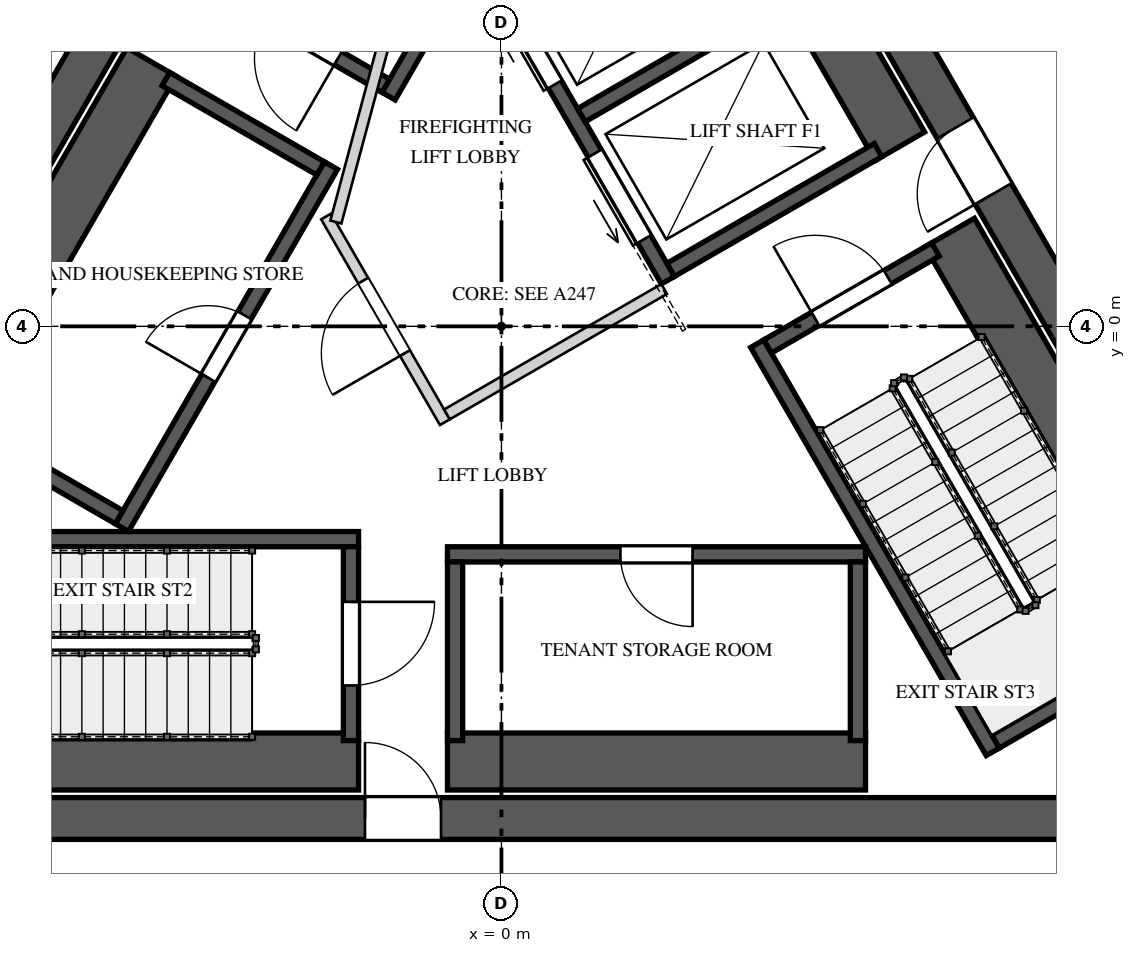
"""IFC4 building model, lengths in metres.
Left out: names, types, materials, properties, quantities, classifications, styles, units other than length and angle.
Written with IfcOpenShell. Run it as: python <this file> out.ifc"""

import sys

from ifc_helpers import new_model, si_unit, direction, frame, frame_2d, origin, place, context, subcontext, project, spatial, rectangle, extrude, element, fill, save


model = new_model("IFC4")
c1 = context("Model", 3, precision=1e-05, world=origin(), true_north=direction((0.0, 1.0)))
c2 = subcontext(c1, "Body", "Model", "MODEL_VIEW")
j1 = project(units=[si_unit("LENGTHUNIT", "METRE"), si_unit("PLANEANGLEUNIT", "RADIAN")], contexts=[c1])
p1 = place(None, origin())
s1 = spatial("IfcSite", under=j1, at=p1, CompositionType="ELEMENT")
p2 = place(p1, origin())
s2 = spatial("IfcBuilding", under=s1, at=p2, CompositionType="ELEMENT")
p3 = place(p2, frame((0.0, 0.0, 361.4)))
s3 = spatial("IfcBuildingStorey", under=s2, at=p3, CompositionType="ELEMENT", Elevation=361.4)
p4 = place(p3, frame((-1.285, 10.725, 0.0), z_axis=(0.0, 0.0, 1.0), x_axis=(-0.499994590896, -0.86602852671, 0.0)))
e1 = element("IfcWall", 1, at=p4, inside=s3, PredefinedType="SHEAR", context=c2, shape_type="SweptSolid", body=[
    extrude(rectangle(XDim=17.292, YDim=0.55, at=frame_2d((8.646, 0.0))), origin(), (0.0, 0.0, 1.0), 4.5),
])
p5 = place(p4, frame((6.851, 0.0, 0.0)))
e2 = element("IfcOpeningElement", 2, at=p5, cuts=e1, PredefinedType="OPENING", context=c2, shape_type="SweptSolid", body=[
    extrude(rectangle(XDim=1.0, YDim=2.4, at=frame_2d((0.5, 1.2))), frame((0.0, 0.285, 0.0), z_axis=(0.0, -1.0, 0.0), x_axis=(1.0, 0.0, 0.0)), (0.0, 0.0, 1.0), 0.57),
])
p6 = place(p4, frame((15.089, 0.0, 0.0)))
e3 = element("IfcOpeningElement", 3, at=p6, cuts=e1, PredefinedType="OPENING", context=c2, shape_type="SweptSolid", body=[
    extrude(rectangle(XDim=0.8, YDim=2.1, at=frame_2d((0.4, 1.05))), frame((0.0, 0.285, 0.0), z_axis=(0.0, -1.0, 0.0), x_axis=(1.0, 0.0, 0.0)), (0.0, 0.0, 1.0), 0.57),
])
p7 = place(p3, frame((-8.646, -6.475, 0.0), z_axis=(0.0, 0.0, 1.0), x_axis=(1.0, 0.0, 0.0)))
e4 = element("IfcWall", 4, at=p7, inside=s3, PredefinedType="SHEAR", context=c2, shape_type="SweptSolid", body=[
    extrude(rectangle(XDim=17.292, YDim=0.55, at=frame_2d((8.646, 0.0))), origin(), (0.0, 0.0, 1.0), 4.5),
])
p8 = place(p7, frame((6.851, 0.0, 0.0)))
e5 = element("IfcOpeningElement", 5, at=p8, cuts=e4, PredefinedType="OPENING", context=c2, shape_type="SweptSolid", body=[
    extrude(rectangle(XDim=1.0, YDim=2.4, at=frame_2d((0.5, 1.2))), frame((0.0, 0.285, 0.0), z_axis=(0.0, -1.0, 0.0), x_axis=(1.0, 0.0, 0.0)), (0.0, 0.0, 1.0), 0.57),
])
p9 = place(p3, frame((9.93, -4.25, 0.0), z_axis=(0.0, 0.0, 1.0), x_axis=(-0.499994590896, 0.86602852671, 0.0)))
e6 = element("IfcWall", 6, at=p9, inside=s3, PredefinedType="SHEAR", context=c2, shape_type="SweptSolid", body=[
    extrude(rectangle(XDim=17.292, YDim=0.55, at=frame_2d((8.646, 0.0))), origin(), (0.0, 0.0, 1.0), 4.5),
])
p10 = place(p9, frame((6.921, 0.0, 0.0)))
e7 = element("IfcOpeningElement", 7, at=p10, cuts=e6, PredefinedType="OPENING", context=c2, shape_type="SweptSolid", body=[
    extrude(rectangle(XDim=1.0, YDim=2.4, at=frame_2d((0.5, 1.2))), frame((0.0, 0.285, 0.0), z_axis=(0.0, -1.0, 0.0), x_axis=(1.0, 0.0, 0.0)), (0.0, 0.0, 1.0), 0.57),
])
p11 = place(p3, frame((1.615, 8.397, 0.0), z_axis=(0.0, 0.0, 1.0), x_axis=(-0.500009909098, -0.866019682689, 0.0)))
e8 = element("IfcWall", 8, at=p11, inside=s3, PredefinedType="SOLIDWALL", context=c2, shape_type="SweptSolid", body=[
    extrude(rectangle(XDim=6.2, YDim=0.2, at=frame_2d((3.1, 0.0))), origin(), (0.0, 0.0, 1.0), 4.15),
])
p12 = place(p3, frame((-1.521, 3.165, 0.0), z_axis=(0.0, 0.0, 1.0), x_axis=(-0.866030925526, 0.499990435942, 0.0)))
e9 = element("IfcWall", 9, at=p12, inside=s3, PredefinedType="SOLIDWALL", context=c2, shape_type="SweptSolid", body=[
    extrude(rectangle(XDim=2.55, YDim=0.2, at=frame_2d((1.275, 0.0))), origin(), (0.0, 0.0, 1.0), 4.15),
])
p13 = place(p12, frame((0.725, 0.0, 0.0)))
e10 = element("IfcOpeningElement", 10, at=p13, cuts=e9, PredefinedType="OPENING", context=c2, shape_type="SweptSolid", body=[
    extrude(rectangle(XDim=1.1, YDim=2.4, at=frame_2d((0.55, 1.2))), frame((0.0, 0.11, 0.0), z_axis=(0.0, -1.0, 0.0), x_axis=(1.0, 0.0, 0.0)), (0.0, 0.0, 1.0), 0.22),
])
p14 = place(p3, frame((-8.08, -5.725, 0.0), z_axis=(0.0, 0.0, 1.0), x_axis=(1.0, 0.0, 0.0)))
e11 = element("IfcWall", 11, at=p14, inside=s3, PredefinedType="SOLIDWALL", context=c2, shape_type="SweptSolid", body=[
    extrude(rectangle(XDim=6.2, YDim=0.75, at=frame_2d((3.1, 0.0))), origin(), (0.0, 0.0, 1.0), 4.15),
])
p15 = place(p3, frame((-8.08, -2.8, 0.0), z_axis=(0.0, 0.0, 1.0), x_axis=(1.0, 0.0, 0.0)))
e12 = element("IfcWall", 12, at=p15, inside=s3, PredefinedType="SOLIDWALL", context=c2, shape_type="SweptSolid", body=[
    extrude(rectangle(XDim=6.2, YDim=0.2, at=frame_2d((3.1, 0.0))), origin(), (0.0, 0.0, 1.0), 4.15),
])
p16 = place(p3, frame((-1.98, -2.9, 0.0), z_axis=(0.0, 0.0, 1.0), x_axis=(0.0, -1.0, 0.0)))
e13 = element("IfcWall", 13, at=p16, inside=s3, PredefinedType="SOLIDWALL", context=c2, shape_type="SweptSolid", body=[
    extrude(rectangle(XDim=2.55, YDim=0.2, at=frame_2d((1.275, 0.0))), origin(), (0.0, 0.0, 1.0), 4.15),
])
p17 = place(p16, frame((0.725, 0.0, 0.0)))
e14 = element("IfcOpeningElement", 14, at=p17, cuts=e13, PredefinedType="OPENING", context=c2, shape_type="SweptSolid", body=[
    extrude(rectangle(XDim=1.1, YDim=2.4, at=frame_2d((0.55, 1.2))), frame((0.0, 0.11, 0.0), z_axis=(0.0, -1.0, 0.0), x_axis=(1.0, 0.0, 0.0)), (0.0, 0.0, 1.0), 0.22),
])
p18 = place(p3, frame((8.998, -4.135, 0.0), z_axis=(0.0, 0.0, 1.0), x_axis=(-0.500009909098, 0.866019682689, 0.0)))
e15 = element("IfcWall", 15, at=p18, inside=s3, PredefinedType="SOLIDWALL", context=c2, shape_type="SweptSolid", body=[
    extrude(rectangle(XDim=6.2, YDim=0.75, at=frame_2d((3.1, 0.0))), origin(), (0.0, 0.0, 1.0), 4.15),
])
p19 = place(p3, frame((6.465, -5.597, 0.0), z_axis=(0.0, 0.0, 1.0), x_axis=(-0.49998037582, 0.866036733513, 0.0)))
e16 = element("IfcWall", 16, at=p19, inside=s3, PredefinedType="SOLIDWALL", context=c2, shape_type="SweptSolid", body=[
    extrude(rectangle(XDim=6.2, YDim=0.2, at=frame_2d((3.1, 0.0))), origin(), (0.0, 0.0, 1.0), 4.15),
])
p20 = place(p3, frame((6.501, -5.461, 0.0), z_axis=(0.0, 0.0, 1.0), x_axis=(0.865989465428, 0.500062241894, 0.0)))
e17 = element("IfcWall", 17, at=p20, inside=s3, PredefinedType="SOLIDWALL", context=c2, shape_type="SweptSolid", body=[
    extrude(rectangle(XDim=2.55, YDim=0.2, at=frame_2d((1.275, 0.0))), origin(), (0.0, 0.0, 1.0), 4.15),
])
p21 = place(p3, frame((3.501, -0.265, 0.0), z_axis=(0.0, 0.0, 1.0), x_axis=(0.866030925526, 0.499990435942, 0.0)))
e18 = element("IfcWall", 18, at=p21, inside=s3, PredefinedType="SOLIDWALL", context=c2, shape_type="SweptSolid", body=[
    extrude(rectangle(XDim=2.55, YDim=0.2, at=frame_2d((1.275, 0.0))), origin(), (0.0, 0.0, 1.0), 4.15),
])
p22 = place(p21, frame((0.725, 0.0, 0.0)))
e19 = element("IfcOpeningElement", 19, at=p22, cuts=e18, PredefinedType="OPENING", context=c2, shape_type="SweptSolid", body=[
    extrude(rectangle(XDim=1.1, YDim=2.4, at=frame_2d((0.55, 1.2))), frame((0.0, 0.11, 0.0), z_axis=(0.0, -1.0, 0.0), x_axis=(1.0, 0.0, 0.0)), (0.0, 0.0, 1.0), 0.22),
])
p23 = place(p3, frame((-4.993, -2.648, 0.0), z_axis=(0.0, 0.0, 1.0), x_axis=(0.499996545922, 0.866027397988, 0.0)))
e20 = element("IfcWall", 20, at=p23, inside=s3, PredefinedType="SOLIDWALL", context=c2, shape_type="SweptSolid", body=[
    extrude(rectangle(XDim=5.5, YDim=0.2, at=frame_2d((2.75, 0.0))), origin(), (0.0, 0.0, 1.0), 4.15),
])
p24 = place(p23, frame((2.275, 0.0, 0.0)))
e21 = element("IfcOpeningElement", 21, at=p24, cuts=e20, PredefinedType="OPENING", context=c2, shape_type="SweptSolid", body=[
    extrude(rectangle(XDim=0.95, YDim=2.4, at=frame_2d((0.475, 1.2))), frame((0.0, 0.11, 0.0), z_axis=(0.0, -1.0, 0.0), x_axis=(1.0, 0.0, 0.0)), (0.0, 0.0, 1.0), 0.22),
])
p25 = place(p3, frame((-4.603, 3.477, 0.0), z_axis=(0.0, 0.0, 1.0), x_axis=(-0.500015767406, -0.866016300277, 0.0)))
e22 = element("IfcWall", 22, at=p25, inside=s3, PredefinedType="SOLIDWALL", context=c2, shape_type="SweptSolid", body=[
    extrude(rectangle(XDim=5.5, YDim=0.75, at=frame_2d((2.75, 0.0))), origin(), (0.0, 0.0, 1.0), 4.15),
])
p26 = place(p3, frame((-2.38, 2.078, 0.0), z_axis=(0.0, 0.0, 1.0), x_axis=(-0.866061024631, 0.499938297808, 0.0)))
e23 = element("IfcWall", 23, at=p26, inside=s3, PredefinedType="SOLIDWALL", context=c2, shape_type="SweptSolid", body=[
    extrude(rectangle(XDim=2.35, YDim=0.2, at=frame_2d((1.175, 0.0))), origin(), (0.0, 0.0, 1.0), 4.15),
])
p27 = place(p3, frame((-5.03, -2.512, 0.0), z_axis=(0.0, 0.0, 1.0), x_axis=(-0.866016039709, 0.500016218704, 0.0)))
e24 = element("IfcWall", 24, at=p27, inside=s3, PredefinedType="SOLIDWALL", context=c2, shape_type="SweptSolid", body=[
    extrude(rectangle(XDim=2.35, YDim=0.2, at=frame_2d((1.175, 0.0))), origin(), (0.0, 0.0, 1.0), 4.15),
])
p28 = place(p3, frame((4.79, -3.0, 0.0), z_axis=(0.0, 0.0, 1.0), x_axis=(-1.0, 0.0, 0.0)))
e25 = element("IfcWall", 25, at=p28, inside=s3, PredefinedType="SOLIDWALL", context=c2, shape_type="SweptSolid", body=[
    extrude(rectangle(XDim=5.5, YDim=0.2, at=frame_2d((2.75, 0.0))), origin(), (0.0, 0.0, 1.0), 4.15),
])
p29 = place(p28, frame((2.275, 0.0, 0.0)))
e26 = element("IfcOpeningElement", 26, at=p29, cuts=e25, PredefinedType="OPENING", context=c2, shape_type="SweptSolid", body=[
    extrude(rectangle(XDim=0.95, YDim=2.4, at=frame_2d((0.475, 1.2))), frame((0.0, 0.11, 0.0), z_axis=(0.0, -1.0, 0.0), x_axis=(1.0, 0.0, 0.0)), (0.0, 0.0, 1.0), 0.22),
])
p30 = place(p3, frame((-0.71, -5.725, 0.0), z_axis=(0.0, 0.0, 1.0), x_axis=(1.0, 0.0, 0.0)))
e27 = element("IfcWall", 27, at=p30, inside=s3, PredefinedType="SOLIDWALL", context=c2, shape_type="SweptSolid", body=[
    extrude(rectangle(XDim=5.5, YDim=0.75, at=frame_2d((2.75, 0.0))), origin(), (0.0, 0.0, 1.0), 4.15),
])
for number, where, z_axis, x_axis in (
    (28, (-0.61, -3.1, 0.0), (0.0, 0.0, 1.0), (0.0, -1.0, 0.0)),
    (29, (4.69, -3.1, 0.0), (0.0, 0.0, 1.0), (0.0, -1.0, 0.0)),
):
    element("IfcWall", number, at=place(p3, frame(where, z_axis=z_axis, x_axis=x_axis)), inside=s3, PredefinedType="SOLIDWALL", context=c2, shape_type="SweptSolid", body=[
        extrude(rectangle(XDim=2.35, YDim=0.2, at=frame_2d((1.175, 0.0))), origin(), (0.0, 0.0, 1.0), 4.15),
    ])
p31 = place(p3, frame((2.19, 0.606, 0.0), z_axis=(0.0, 0.0, 1.0), x_axis=(-0.500002801628, 0.866023786258, 0.0)))
e30 = element("IfcWall", 30, at=p31, inside=s3, PredefinedType="SOLIDWALL", context=c2, shape_type="SweptSolid", body=[
    extrude(rectangle(XDim=4.9, YDim=0.2, at=frame_2d((2.45, 0.0))), origin(), (0.0, 0.0, 1.0), 4.15),
])
p32 = place(p31, frame((0.625, 0.0, 0.0)))
e31 = element("IfcOpeningElement", 31, at=p32, cuts=e30, PredefinedType="OPENING", context=c2, shape_type="SweptSolid", body=[
    extrude(rectangle(XDim=1.3, YDim=2.1, at=frame_2d((0.65, 1.05))), frame((0.0, 0.11, 0.0), z_axis=(0.0, -1.0, 0.0), x_axis=(1.0, 0.0, 0.0)), (0.0, 0.0, 1.0), 0.22),
])
p33 = place(p31, frame((2.975, 0.0, 0.0)))
e32 = element("IfcOpeningElement", 32, at=p33, cuts=e30, PredefinedType="OPENING", context=c2, shape_type="SweptSolid", body=[
    extrude(rectangle(XDim=1.3, YDim=2.1, at=frame_2d((0.65, 1.05))), frame((0.0, 0.11, 0.0), z_axis=(0.0, -1.0, 0.0), x_axis=(1.0, 0.0, 0.0)), (0.0, 0.0, 1.0), 0.22),
])
p34 = place(p3, frame((5.243, 2.369, 0.0), z_axis=(0.0, 0.0, 1.0), x_axis=(-0.500002801628, 0.866023786258, 0.0)))
e33 = element("IfcWall", 33, at=p34, inside=s3, PredefinedType="SOLIDWALL", context=c2, shape_type="SweptSolid", body=[
    extrude(rectangle(XDim=4.9, YDim=0.75, at=frame_2d((2.45, 0.0))), origin(), (0.0, 0.0, 1.0), 4.15),
])
for number, where, z_axis, x_axis in (
    (34, (2.227, 0.743, 0.0), (0.0, 0.0, 1.0), (0.866, 0.5, 0.0)),
    (35, (1.052, 2.778, 0.0), (0.0, 0.0, 1.0), (0.866, 0.5, 0.0)),
):
    element("IfcWall", number, at=place(p3, frame(where, z_axis=z_axis, x_axis=x_axis)), inside=s3, PredefinedType="SOLIDWALL", context=c2, shape_type="SweptSolid", body=[
        extrude(rectangle(XDim=3.15, YDim=0.2, at=frame_2d((1.575, 0.0))), origin(), (0.0, 0.0, 1.0), 4.15),
    ])
p35 = place(p3, frame((-0.744, -1.261, 0.0), z_axis=(0.0, 0.0, 1.0), x_axis=(-0.500004234368, 0.866022959057, 0.0)))
e36 = element("IfcWall", 36, at=p35, inside=s3, PredefinedType="PARTITIONING", context=c2, shape_type="SweptSolid", body=[
    extrude(rectangle(XDim=3.125, YDim=0.15, at=frame_2d((1.562, 0.0))), origin(), (0.0, 0.0, 1.0), 4.15),
])
p36 = place(p35, frame((1.05, 0.0, 0.0)))
e37 = element("IfcOpeningElement", 37, at=p36, cuts=e36, PredefinedType="OPENING", context=c2, shape_type="SweptSolid", body=[
    extrude(rectangle(XDim=1.1, YDim=2.4, at=frame_2d((0.55, 1.2))), frame((0.0, 0.085, 0.0), z_axis=(0.0, -1.0, 0.0), x_axis=(1.0, 0.0, 0.0)), (0.0, 0.0, 1.0), 0.17),
])
p37 = place(p3, frame((-0.717, -1.159, 0.0), z_axis=(0.0, 0.0, 1.0), x_axis=(0.866008176907, 0.50002983664, 0.0)))
e38 = element("IfcWall", 38, at=p37, inside=s3, PredefinedType="PARTITIONING", context=c2, shape_type="SweptSolid", body=[
    extrude(rectangle(XDim=3.3, YDim=0.15, at=frame_2d((1.65, 0.0))), origin(), (0.0, 0.0, 1.0), 4.15),
])
p38 = place(p3, frame((-2.178, 1.372, 0.0), z_axis=(0.0, 0.0, 1.0), x_axis=(0.258808958833, 0.96592852884, 0.0)))
e39 = element("IfcWall", 39, at=p38, inside=s3, PredefinedType="PARTITIONING", context=c2, shape_type="SweptSolid", body=[
    extrude(rectangle(XDim=2.903, YDim=0.15, at=frame_2d((1.451, 0.0))), origin(), (0.0, 0.0, 1.0), 4.15),
])
p39 = place(p13, origin())
e40 = element("IfcDoor", 40, at=p39, inside=s3, OperationType="SINGLE_SWING_RIGHT", PredefinedType="DOOR", context=c2, shape_type="SweptSolid", body=[
    extrude(rectangle(XDim=1.1, YDim=2.4, at=frame_2d((0.55, 1.2))), frame((0.0, 0.025, 0.0), z_axis=(0.0, -1.0, 0.0), x_axis=(1.0, 0.0, 0.0)), (0.0, 0.0, 1.0), 0.05),
])
fill(e10, e40)
p40 = place(p17, origin())
e41 = element("IfcDoor", 41, at=p40, inside=s3, OperationType="SINGLE_SWING_LEFT", PredefinedType="DOOR", context=c2, shape_type="SweptSolid", body=[
    extrude(rectangle(XDim=1.1, YDim=2.4, at=frame_2d((0.55, 1.2))), frame((0.0, 0.025, 0.0), z_axis=(0.0, -1.0, 0.0), x_axis=(1.0, 0.0, 0.0)), (0.0, 0.0, 1.0), 0.05),
])
fill(e14, e41)
p41 = place(p22, origin())
e42 = element("IfcDoor", 42, at=p41, inside=s3, OperationType="SINGLE_SWING_RIGHT", PredefinedType="DOOR", context=c2, shape_type="SweptSolid", body=[
    extrude(rectangle(XDim=1.1, YDim=2.4, at=frame_2d((0.55, 1.2))), frame((0.0, 0.025, 0.0), z_axis=(0.0, -1.0, 0.0), x_axis=(1.0, 0.0, 0.0)), (0.0, 0.0, 1.0), 0.05),
])
fill(e19, e42)
p42 = place(p24, origin())
e43 = element("IfcDoor", 43, at=p42, inside=s3, OperationType="SINGLE_SWING_LEFT", PredefinedType="DOOR", context=c2, shape_type="SweptSolid", body=[
    extrude(rectangle(XDim=0.95, YDim=2.4, at=frame_2d((0.475, 1.2))), frame((0.0, 0.025, 0.0), z_axis=(0.0, -1.0, 0.0), x_axis=(1.0, 0.0, 0.0)), (0.0, 0.0, 1.0), 0.05),
])
fill(e21, e43)
p43 = place(p29, origin())
e44 = element("IfcDoor", 44, at=p43, inside=s3, OperationType="SINGLE_SWING_RIGHT", PredefinedType="DOOR", context=c2, shape_type="SweptSolid", body=[
    extrude(rectangle(XDim=0.95, YDim=2.4, at=frame_2d((0.475, 1.2))), frame((0.0, 0.025, 0.0), z_axis=(0.0, -1.0, 0.0), x_axis=(1.0, 0.0, 0.0)), (0.0, 0.0, 1.0), 0.05),
])
fill(e26, e44)
p44 = place(p32, origin())
e45 = element("IfcDoor", 45, at=p44, inside=s3, OperationType="SLIDING_TO_LEFT", PredefinedType="DOOR", context=c2, shape_type="SweptSolid", body=[
    extrude(rectangle(XDim=1.3, YDim=2.1, at=frame_2d((0.65, 1.05))), frame((0.0, 0.025, 0.0), z_axis=(0.0, -1.0, 0.0), x_axis=(1.0, 0.0, 0.0)), (0.0, 0.0, 1.0), 0.05),
])
fill(e31, e45)
p45 = place(p33, origin())
e46 = element("IfcDoor", 46, at=p45, inside=s3, OperationType="SLIDING_TO_RIGHT", PredefinedType="DOOR", context=c2, shape_type="SweptSolid", body=[
    extrude(rectangle(XDim=1.3, YDim=2.1, at=frame_2d((0.65, 1.05))), frame((0.0, 0.025, 0.0), z_axis=(0.0, -1.0, 0.0), x_axis=(1.0, 0.0, 0.0)), (0.0, 0.0, 1.0), 0.05),
])
fill(e32, e46)
p46 = place(p36, origin())
e47 = element("IfcDoor", 47, at=p46, inside=s3, OperationType="SINGLE_SWING_LEFT", PredefinedType="DOOR", context=c2, shape_type="SweptSolid", body=[
    extrude(rectangle(XDim=1.1, YDim=2.4, at=frame_2d((0.55, 1.2))), frame((0.0, 0.025, 0.0), z_axis=(0.0, -1.0, 0.0), x_axis=(1.0, 0.0, 0.0)), (0.0, 0.0, 1.0), 0.05),
])
fill(e37, e47)
p47 = place(p8, origin())
e48 = element("IfcDoor", 48, at=p47, inside=s3, OperationType="SINGLE_SWING_LEFT", PredefinedType="DOOR", context=c2, shape_type="SweptSolid", body=[
    extrude(rectangle(XDim=1.0, YDim=2.4, at=frame_2d((0.5, 1.2))), frame((0.0, 0.025, 0.0), z_axis=(0.0, -1.0, 0.0), x_axis=(1.0, 0.0, 0.0)), (0.0, 0.0, 1.0), 0.05),
])
fill(e5, e48)
p48 = place(p10, origin())
e49 = element("IfcDoor", 49, at=p48, inside=s3, OperationType="SINGLE_SWING_RIGHT", PredefinedType="DOOR", context=c2, shape_type="SweptSolid", body=[
    extrude(rectangle(XDim=1.0, YDim=2.4, at=frame_2d((0.5, 1.2))), frame((0.0, 0.025, 0.0), z_axis=(0.0, -1.0, 0.0), x_axis=(1.0, 0.0, 0.0)), (0.0, 0.0, 1.0), 0.05),
])
fill(e7, e49)
save(model, sys.argv[1])
